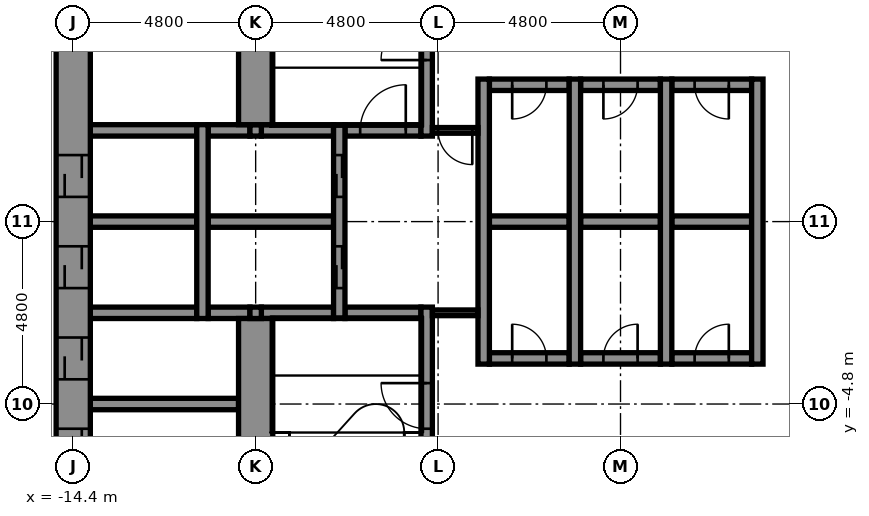
"""IFC4 building model, lengths in metres.
Left out: names, types, materials, properties, quantities, classifications, styles, units other than length and angle.
Written with IfcOpenShell. Run it as: python <this file> out.ifc"""

import sys

from ifc_helpers import new_model, si_unit, direction, frame, frame_2d, origin, place, context, subcontext, project, spatial, rectangle, extrude, element, fill, save


model = new_model("IFC4")
c1 = context("Model", 3, precision=1e-05, world=origin(), true_north=direction((0.0, 1.0)))
c2 = subcontext(c1, "Body", "Model", "MODEL_VIEW")
j1 = project(units=[si_unit("LENGTHUNIT", "METRE"), si_unit("PLANEANGLEUNIT", "RADIAN")], contexts=[c1])
p1 = place(None, origin())
s1 = spatial("IfcSite", under=j1, at=p1, CompositionType="ELEMENT")
p2 = place(p1, origin())
s2 = spatial("IfcBuilding", under=s1, at=p2, CompositionType="ELEMENT")
p3 = place(p2, frame((0.0, 0.0, 77.9)))
s3 = spatial("IfcBuildingStorey", under=s2, at=p3, CompositionType="ELEMENT", Elevation=77.9)
p4 = place(p3, frame((-13.95, -4.8, -0.2), z_axis=(0.0, 0.0, 1.0), x_axis=(1.0, 0.0, 0.0)))
e1 = element("IfcWall", 1, at=p4, inside=s3, PredefinedType="STANDARD", context=c2, shape_type="SweptSolid", body=[
    extrude(rectangle(XDim=3.9, YDim=0.3, at=frame_2d((1.95, 0.0))), origin(), (0.0, 0.0, 1.0), 4.5),
])
p5 = place(p3, frame((-3.45, -3.6, -0.2), z_axis=(0.0, 0.0, 1.0), x_axis=(1.0, 0.0, 0.0)))
e2 = element("IfcWall", 2, at=p5, inside=s3, PredefinedType="STANDARD", context=c2, shape_type="SweptSolid", body=[
    extrude(rectangle(XDim=2.1, YDim=0.3, at=frame_2d((1.05, 0.0))), origin(), (0.0, 0.0, 1.0), 4.5),
])
p6 = place(p5, frame((0.6, 0.0, 0.2)))
e3 = element("IfcOpeningElement", 3, at=p6, cuts=e2, PredefinedType="OPENING", context=c2, shape_type="SweptSolid", body=[
    extrude(rectangle(XDim=0.9, YDim=2.1, at=frame_2d((0.45, 1.05))), frame((0.0, 0.16, 0.0), z_axis=(0.0, -1.0, 0.0), x_axis=(1.0, 0.0, 0.0)), (0.0, 0.0, 1.0), 0.32),
])
p7 = place(p3, frame((-1.05, -3.6, -0.2), z_axis=(0.0, 0.0, 1.0), x_axis=(1.0, 0.0, 0.0)))
e4 = element("IfcWall", 4, at=p7, inside=s3, PredefinedType="STANDARD", context=c2, shape_type="SweptSolid", body=[
    extrude(rectangle(XDim=2.1, YDim=0.3, at=frame_2d((1.05, 0.0))), origin(), (0.0, 0.0, 1.0), 4.5),
])
p8 = place(p7, frame((0.6, 0.0, 0.2)))
e5 = element("IfcOpeningElement", 5, at=p8, cuts=e4, PredefinedType="OPENING", context=c2, shape_type="SweptSolid", body=[
    extrude(rectangle(XDim=0.9, YDim=2.1, at=frame_2d((0.45, 1.05))), frame((0.0, 0.16, 0.0), z_axis=(0.0, -1.0, 0.0), x_axis=(1.0, 0.0, 0.0)), (0.0, 0.0, 1.0), 0.32),
])
p9 = place(p3, frame((1.35, -3.6, -0.2), z_axis=(0.0, 0.0, 1.0), x_axis=(1.0, 0.0, 0.0)))
e6 = element("IfcWall", 6, at=p9, inside=s3, PredefinedType="STANDARD", context=c2, shape_type="SweptSolid", body=[
    extrude(rectangle(XDim=2.1, YDim=0.3, at=frame_2d((1.05, 0.0))), origin(), (0.0, 0.0, 1.0), 4.5),
])
p10 = place(p9, frame((0.6, 0.0, 0.2)))
e7 = element("IfcOpeningElement", 7, at=p10, cuts=e6, PredefinedType="OPENING", context=c2, shape_type="SweptSolid", body=[
    extrude(rectangle(XDim=0.9, YDim=2.1, at=frame_2d((0.45, 1.05))), frame((0.0, 0.16, 0.0), z_axis=(0.0, -1.0, 0.0), x_axis=(1.0, 0.0, 0.0)), (0.0, 0.0, 1.0), 0.32),
])
p11 = place(p3, frame((-13.95, -2.4, -0.2), z_axis=(0.0, 0.0, 1.0), x_axis=(1.0, 0.0, 0.0)))
e8 = element("IfcWall", 8, at=p11, inside=s3, PredefinedType="STANDARD", context=c2, shape_type="SweptSolid", body=[
    extrude(rectangle(XDim=2.8, YDim=0.3, at=frame_2d((1.4, 0.0))), origin(), (0.0, 0.0, 1.0), 4.5),
])
p12 = place(p3, frame((-10.85, -2.4, -0.2), z_axis=(0.0, 0.0, 1.0), x_axis=(1.0, 0.0, 0.0)))
e9 = element("IfcWall", 9, at=p12, inside=s3, PredefinedType="STANDARD", context=c2, shape_type="SweptSolid", body=[
    extrude(rectangle(XDim=1.1, YDim=0.3, at=frame_2d((0.55, 0.0))), origin(), (0.0, 0.0, 1.0), 4.5),
])
p13 = place(p3, frame((-9.45, -2.4, -0.2), z_axis=(0.0, 0.0, 1.0), x_axis=(1.0, 0.0, 0.0)))
e10 = element("IfcWall", 10, at=p13, inside=s3, PredefinedType="STANDARD", context=c2, shape_type="SweptSolid", body=[
    extrude(rectangle(XDim=1.9, YDim=0.3, at=frame_2d((0.95, 0.0))), origin(), (0.0, 0.0, 1.0), 4.5),
])
p14 = place(p3, frame((-7.25, -2.4, -0.2), z_axis=(0.0, 0.0, 1.0), x_axis=(1.0, 0.0, 0.0)))
e11 = element("IfcWall", 11, at=p14, inside=s3, PredefinedType="STANDARD", context=c2, shape_type="SweptSolid", body=[
    extrude(rectangle(XDim=2.0, YDim=0.3, at=frame_2d((1.0, 0.0))), origin(), (0.0, 0.0, 1.0), 4.5),
])
p15 = place(p3, frame((-13.95, 0.0, -0.2), z_axis=(0.0, 0.0, 1.0), x_axis=(1.0, 0.0, 0.0)))
e12 = element("IfcWall", 12, at=p15, inside=s3, PredefinedType="STANDARD", context=c2, shape_type="SweptSolid", body=[
    extrude(rectangle(XDim=2.8, YDim=0.3, at=frame_2d((1.4, 0.0))), origin(), (0.0, 0.0, 1.0), 4.5),
])
p16 = place(p3, frame((-10.85, 0.0, -0.2), z_axis=(0.0, 0.0, 1.0), x_axis=(1.0, 0.0, 0.0)))
e13 = element("IfcWall", 13, at=p16, inside=s3, PredefinedType="STANDARD", context=c2, shape_type="SweptSolid", body=[
    extrude(rectangle(XDim=3.3, YDim=0.3, at=frame_2d((1.65, 0.0))), origin(), (0.0, 0.0, 1.0), 4.5),
])
p17 = place(p3, frame((-3.45, 0.0, -0.2), z_axis=(0.0, 0.0, 1.0), x_axis=(1.0, 0.0, 0.0)))
e14 = element("IfcWall", 14, at=p17, inside=s3, PredefinedType="STANDARD", context=c2, shape_type="SweptSolid", body=[
    extrude(rectangle(XDim=2.1, YDim=0.3, at=frame_2d((1.05, 0.0))), origin(), (0.0, 0.0, 1.0), 4.5),
])
p18 = place(p3, frame((-1.05, 0.0, -0.2), z_axis=(0.0, 0.0, 1.0), x_axis=(1.0, 0.0, 0.0)))
e15 = element("IfcWall", 15, at=p18, inside=s3, PredefinedType="STANDARD", context=c2, shape_type="SweptSolid", body=[
    extrude(rectangle(XDim=2.1, YDim=0.3, at=frame_2d((1.05, 0.0))), origin(), (0.0, 0.0, 1.0), 4.5),
])
p19 = place(p3, frame((1.35, 0.0, -0.2), z_axis=(0.0, 0.0, 1.0), x_axis=(1.0, 0.0, 0.0)))
e16 = element("IfcWall", 16, at=p19, inside=s3, PredefinedType="STANDARD", context=c2, shape_type="SweptSolid", body=[
    extrude(rectangle(XDim=2.1, YDim=0.3, at=frame_2d((1.05, 0.0))), origin(), (0.0, 0.0, 1.0), 4.5),
])
p20 = place(p3, frame((-13.95, 2.4, -0.2), z_axis=(0.0, 0.0, 1.0), x_axis=(1.0, 0.0, 0.0)))
e17 = element("IfcWall", 17, at=p20, inside=s3, PredefinedType="STANDARD", context=c2, shape_type="SweptSolid", body=[
    extrude(rectangle(XDim=2.8, YDim=0.3, at=frame_2d((1.4, 0.0))), origin(), (0.0, 0.0, 1.0), 4.5),
])
p21 = place(p3, frame((-10.85, 2.4, -0.2), z_axis=(0.0, 0.0, 1.0), x_axis=(1.0, 0.0, 0.0)))
e18 = element("IfcWall", 18, at=p21, inside=s3, PredefinedType="STANDARD", context=c2, shape_type="SweptSolid", body=[
    extrude(rectangle(XDim=1.1, YDim=0.3, at=frame_2d((0.55, 0.0))), origin(), (0.0, 0.0, 1.0), 4.5),
])
p22 = place(p3, frame((-9.45, 2.4, -0.2), z_axis=(0.0, 0.0, 1.0), x_axis=(1.0, 0.0, 0.0)))
e19 = element("IfcWall", 19, at=p22, inside=s3, PredefinedType="STANDARD", context=c2, shape_type="SweptSolid", body=[
    extrude(rectangle(XDim=1.9, YDim=0.3, at=frame_2d((0.95, 0.0))), origin(), (0.0, 0.0, 1.0), 4.5),
])
p23 = place(p3, frame((-7.25, 2.4, -0.2), z_axis=(0.0, 0.0, 1.0), x_axis=(1.0, 0.0, 0.0)))
e20 = element("IfcWall", 20, at=p23, inside=s3, PredefinedType="STANDARD", context=c2, shape_type="SweptSolid", body=[
    extrude(rectangle(XDim=2.0, YDim=0.3, at=frame_2d((1.0, 0.0))), origin(), (0.0, 0.0, 1.0), 4.5),
])
p24 = place(p23, frame((0.4, 0.0, 0.2)))
e21 = element("IfcOpeningElement", 21, at=p24, cuts=e20, PredefinedType="OPENING", context=c2, shape_type="SweptSolid", body=[
    extrude(rectangle(XDim=1.2, YDim=2.1, at=frame_2d((0.6, 1.05))), frame((0.0, 0.16, 0.0), z_axis=(0.0, -1.0, 0.0), x_axis=(1.0, 0.0, 0.0)), (0.0, 0.0, 1.0), 0.32),
])
p25 = place(p3, frame((-3.45, 3.6, -0.2), z_axis=(0.0, 0.0, 1.0), x_axis=(1.0, 0.0, 0.0)))
e22 = element("IfcWall", 22, at=p25, inside=s3, PredefinedType="STANDARD", context=c2, shape_type="SweptSolid", body=[
    extrude(rectangle(XDim=2.1, YDim=0.3, at=frame_2d((1.05, 0.0))), origin(), (0.0, 0.0, 1.0), 4.5),
])
p26 = place(p25, frame((0.6, 0.0, 0.2)))
e23 = element("IfcOpeningElement", 23, at=p26, cuts=e22, PredefinedType="OPENING", context=c2, shape_type="SweptSolid", body=[
    extrude(rectangle(XDim=0.9, YDim=2.1, at=frame_2d((0.45, 1.05))), frame((0.0, 0.16, 0.0), z_axis=(0.0, -1.0, 0.0), x_axis=(1.0, 0.0, 0.0)), (0.0, 0.0, 1.0), 0.32),
])
p27 = place(p3, frame((-1.05, 3.6, -0.2), z_axis=(0.0, 0.0, 1.0), x_axis=(1.0, 0.0, 0.0)))
e24 = element("IfcWall", 24, at=p27, inside=s3, PredefinedType="STANDARD", context=c2, shape_type="SweptSolid", body=[
    extrude(rectangle(XDim=2.1, YDim=0.3, at=frame_2d((1.05, 0.0))), origin(), (0.0, 0.0, 1.0), 4.5),
])
p28 = place(p27, frame((0.6, 0.0, 0.2)))
e25 = element("IfcOpeningElement", 25, at=p28, cuts=e24, PredefinedType="OPENING", context=c2, shape_type="SweptSolid", body=[
    extrude(rectangle(XDim=0.9, YDim=2.1, at=frame_2d((0.45, 1.05))), frame((0.0, 0.16, 0.0), z_axis=(0.0, -1.0, 0.0), x_axis=(1.0, 0.0, 0.0)), (0.0, 0.0, 1.0), 0.32),
])
p29 = place(p3, frame((1.35, 3.6, -0.2), z_axis=(0.0, 0.0, 1.0), x_axis=(1.0, 0.0, 0.0)))
e26 = element("IfcWall", 26, at=p29, inside=s3, PredefinedType="STANDARD", context=c2, shape_type="SweptSolid", body=[
    extrude(rectangle(XDim=2.1, YDim=0.3, at=frame_2d((1.05, 0.0))), origin(), (0.0, 0.0, 1.0), 4.5),
])
p30 = place(p29, frame((0.6, 0.0, 0.2)))
e27 = element("IfcOpeningElement", 27, at=p30, cuts=e26, PredefinedType="OPENING", context=c2, shape_type="SweptSolid", body=[
    extrude(rectangle(XDim=0.9, YDim=2.1, at=frame_2d((0.45, 1.05))), frame((0.0, 0.16, 0.0), z_axis=(0.0, -1.0, 0.0), x_axis=(1.0, 0.0, 0.0)), (0.0, 0.0, 1.0), 0.32),
])
p31 = place(p3, frame((-14.4, -10.05, -0.2), z_axis=(0.0, 0.0, 1.0), x_axis=(0.0, 1.0, 0.0)))
e28 = element("IfcWall", 28, at=p31, inside=s3, PredefinedType="SHEAR", context=c2, shape_type="SweptSolid", body=[
    extrude(rectangle(XDim=20.1, YDim=0.9, at=frame_2d((10.05, 0.0))), origin(), (0.0, 0.0, 1.0), 4.5),
])
p32 = place(p31, frame((3.5, 0.0, 0.2)))
e29 = element("IfcOpeningElement", 29, at=p32, cuts=e28, PredefinedType="OPENING", context=c2, shape_type="SweptSolid", body=[
    extrude(rectangle(XDim=1.1, YDim=2.1, at=frame_2d((0.55, 1.05))), frame((0.0, 0.46, 0.0), z_axis=(0.0, -1.0, 0.0), x_axis=(1.0, 0.0, 0.0)), (0.0, 0.0, 1.0), 0.92),
])
p33 = place(p31, frame((5.9, 0.0, 0.2)))
e30 = element("IfcOpeningElement", 30, at=p33, cuts=e28, PredefinedType="OPENING", context=c2, shape_type="SweptSolid", body=[
    extrude(rectangle(XDim=1.1, YDim=2.1, at=frame_2d((0.55, 1.05))), frame((0.0, 0.46, 0.0), z_axis=(0.0, -1.0, 0.0), x_axis=(1.0, 0.0, 0.0)), (0.0, 0.0, 1.0), 0.92),
])
p34 = place(p31, frame((8.3, 0.0, 0.2)))
e31 = element("IfcOpeningElement", 31, at=p34, cuts=e28, PredefinedType="OPENING", context=c2, shape_type="SweptSolid", body=[
    extrude(rectangle(XDim=1.1, YDim=2.1, at=frame_2d((0.55, 1.05))), frame((0.0, 0.46, 0.0), z_axis=(0.0, -1.0, 0.0), x_axis=(1.0, 0.0, 0.0)), (0.0, 0.0, 1.0), 0.92),
])
p35 = place(p31, frame((10.7, 0.0, 0.2)))
e32 = element("IfcOpeningElement", 32, at=p35, cuts=e28, PredefinedType="OPENING", context=c2, shape_type="SweptSolid", body=[
    extrude(rectangle(XDim=1.1, YDim=2.1, at=frame_2d((0.55, 1.05))), frame((0.0, 0.46, 0.0), z_axis=(0.0, -1.0, 0.0), x_axis=(1.0, 0.0, 0.0)), (0.0, 0.0, 1.0), 0.92),
])
p36 = place(p3, frame((-11.0, -2.55, -0.2), z_axis=(0.0, 0.0, 1.0), x_axis=(0.0, 1.0, 0.0)))
e33 = element("IfcWall", 33, at=p36, inside=s3, PredefinedType="STANDARD", context=c2, shape_type="SweptSolid", body=[
    extrude(rectangle(XDim=5.1, YDim=0.3, at=frame_2d((2.55, 0.0))), origin(), (0.0, 0.0, 1.0), 4.5),
])
p37 = place(p3, frame((-9.6, -10.15, -0.2), z_axis=(0.0, 0.0, 1.0), x_axis=(0.0, 1.0, 0.0)))
e34 = element("IfcWall", 34, at=p37, inside=s3, PredefinedType="SHEAR", context=c2, shape_type="SweptSolid", body=[
    extrude(rectangle(XDim=7.6, YDim=0.9, at=frame_2d((3.8, 0.0))), origin(), (0.0, 0.0, 1.0), 4.5),
])
for number, where, z_axis, x_axis in (
    (35, (-9.6, -2.55, -0.2), (0.0, 0.0, 1.0), (0.0, 1.0, 0.0)),
    (36, (-9.6, 2.25, -0.2), (0.0, 0.0, 1.0), (0.0, 1.0, 0.0)),
):
    element("IfcWall", number, at=place(p3, frame(where, z_axis=z_axis, x_axis=x_axis)), inside=s3, PredefinedType="STANDARD", context=c2, shape_type="SweptSolid", body=[
        extrude(rectangle(XDim=0.3, YDim=0.3, at=frame_2d((0.15, 0.0))), origin(), (0.0, 0.0, 1.0), 4.5),
    ])
p38 = place(p3, frame((-9.6, 2.55, -0.2), z_axis=(0.0, 0.0, 1.0), x_axis=(0.0, 1.0, 0.0)))
e37 = element("IfcWall", 37, at=p38, inside=s3, PredefinedType="SHEAR", context=c2, shape_type="SweptSolid", body=[
    extrude(rectangle(XDim=7.6, YDim=0.9, at=frame_2d((3.8, 0.0))), origin(), (0.0, 0.0, 1.0), 4.5),
])
p39 = place(p3, frame((-7.4, -2.55, -0.2), z_axis=(0.0, 0.0, 1.0), x_axis=(0.0, 1.0, 0.0)))
e38 = element("IfcWall", 38, at=p39, inside=s3, PredefinedType="STANDARD", context=c2, shape_type="SweptSolid", body=[
    extrude(rectangle(XDim=5.1, YDim=0.3, at=frame_2d((2.55, 0.0))), origin(), (0.0, 0.0, 1.0), 4.5),
])
p40 = place(p39, frame((0.8, 0.0, 0.2)))
e39 = element("IfcOpeningElement", 39, at=p40, cuts=e38, PredefinedType="OPENING", context=c2, shape_type="SweptSolid", body=[
    extrude(rectangle(XDim=1.1, YDim=2.1, at=frame_2d((0.55, 1.05))), frame((0.0, 0.16, 0.0), z_axis=(0.0, -1.0, 0.0), x_axis=(1.0, 0.0, 0.0)), (0.0, 0.0, 1.0), 0.32),
])
p41 = place(p39, frame((3.2, 0.0, 0.2)))
e40 = element("IfcOpeningElement", 40, at=p41, cuts=e38, PredefinedType="OPENING", context=c2, shape_type="SweptSolid", body=[
    extrude(rectangle(XDim=1.1, YDim=2.1, at=frame_2d((0.55, 1.05))), frame((0.0, 0.16, 0.0), z_axis=(0.0, -1.0, 0.0), x_axis=(1.0, 0.0, 0.0)), (0.0, 0.0, 1.0), 0.32),
])
p42 = place(p3, frame((-5.1, -9.15, -0.2), z_axis=(0.0, 0.0, 1.0), x_axis=(0.0, 1.0, 0.0)))
e41 = element("IfcWall", 41, at=p42, inside=s3, PredefinedType="STANDARD", context=c2, shape_type="SweptSolid", body=[
    extrude(rectangle(XDim=6.9, YDim=0.3, at=frame_2d((3.45, 0.0))), origin(), (0.0, 0.0, 1.0), 4.5),
])
p43 = place(p42, frame((3.7, 0.0, 0.2)))
e42 = element("IfcOpeningElement", 42, at=p43, cuts=e41, PredefinedType="OPENING", context=c2, shape_type="SweptSolid", body=[
    extrude(rectangle(XDim=1.2, YDim=2.1, at=frame_2d((0.6, 1.05))), frame((0.0, 0.16, 0.0), z_axis=(0.0, -1.0, 0.0), x_axis=(1.0, 0.0, 0.0)), (0.0, 0.0, 1.0), 0.32),
])
p44 = place(p3, frame((-5.1, 2.25, -0.2), z_axis=(0.0, 0.0, 1.0), x_axis=(0.0, 1.0, 0.0)))
e43 = element("IfcWall", 43, at=p44, inside=s3, PredefinedType="STANDARD", context=c2, shape_type="SweptSolid", body=[
    extrude(rectangle(XDim=6.9, YDim=0.3, at=frame_2d((3.45, 0.0))), origin(), (0.0, 0.0, 1.0), 4.5),
])
p45 = place(p44, frame((2.0, 0.0, 0.2)))
e44 = element("IfcOpeningElement", 44, at=p45, cuts=e43, PredefinedType="OPENING", context=c2, shape_type="SweptSolid", body=[
    extrude(rectangle(XDim=1.2, YDim=2.1, at=frame_2d((0.6, 1.05))), frame((0.0, 0.16, 0.0), z_axis=(0.0, -1.0, 0.0), x_axis=(1.0, 0.0, 0.0)), (0.0, 0.0, 1.0), 0.32),
])
for number, where, z_axis, x_axis in (
    (45, (-3.6, -3.75, -0.2), (0.0, 0.0, 1.0), (0.0, 1.0, 0.0)),
    (46, (-1.2, -3.75, -0.2), (0.0, 0.0, 1.0), (0.0, 1.0, 0.0)),
    (47, (1.2, -3.75, -0.2), (0.0, 0.0, 1.0), (0.0, 1.0, 0.0)),
    (48, (3.6, -3.75, -0.2), (0.0, 0.0, 1.0), (0.0, 1.0, 0.0)),
):
    element("IfcWall", number, at=place(p3, frame(where, z_axis=z_axis, x_axis=x_axis)), inside=s3, PredefinedType="STANDARD", context=c2, shape_type="SweptSolid", body=[
        extrude(rectangle(XDim=7.5, YDim=0.3, at=frame_2d((3.75, 0.0))), origin(), (0.0, 0.0, 1.0), 4.5),
    ])
p46 = place(p3, frame((-4.95, 2.4, 0.0), z_axis=(0.0, 0.0, 1.0), x_axis=(1.0, 0.0, 0.0)))
e49 = element("IfcWall", 49, at=p46, inside=s3, PredefinedType="PARTITIONING", context=c2, shape_type="SweptSolid", body=[
    extrude(rectangle(XDim=1.2, YDim=0.15, at=frame_2d((0.6, 0.0))), origin(), (0.0, 0.0, 1.0), 4.3),
])
p47 = place(p46, frame((0.15, 0.0, 0.0)))
e50 = element("IfcOpeningElement", 50, at=p47, cuts=e49, PredefinedType="OPENING", context=c2, shape_type="SweptSolid", body=[
    extrude(rectangle(XDim=0.9, YDim=2.1, at=frame_2d((0.45, 1.05))), frame((0.0, 0.085, 0.0), z_axis=(0.0, -1.0, 0.0), x_axis=(1.0, 0.0, 0.0)), (0.0, 0.0, 1.0), 0.17),
])
p48 = place(p3, frame((-4.95, -2.4, 0.0), z_axis=(0.0, 0.0, 1.0), x_axis=(1.0, 0.0, 0.0)))
e51 = element("IfcWall", 51, at=p48, inside=s3, PredefinedType="PARTITIONING", context=c2, shape_type="SweptSolid", body=[
    extrude(rectangle(XDim=1.2, YDim=0.15, at=frame_2d((0.6, 0.0))), origin(), (0.0, 0.0, 1.0), 4.3),
])
p49 = place(p40, origin())
e52 = element("IfcDoor", 52, at=p49, inside=s3, OperationType="DOUBLE_DOOR_SLIDING", PredefinedType="DOOR", context=c2, shape_type="SweptSolid", body=[
    extrude(rectangle(XDim=1.1, YDim=2.1, at=frame_2d((0.55, 1.05))), frame((0.0, 0.025, 0.0), z_axis=(0.0, -1.0, 0.0), x_axis=(1.0, 0.0, 0.0)), (0.0, 0.0, 1.0), 0.05),
])
fill(e39, e52)
p50 = place(p41, origin())
e53 = element("IfcDoor", 53, at=p50, inside=s3, OperationType="DOUBLE_DOOR_SLIDING", PredefinedType="DOOR", context=c2, shape_type="SweptSolid", body=[
    extrude(rectangle(XDim=1.1, YDim=2.1, at=frame_2d((0.55, 1.05))), frame((0.0, 0.025, 0.0), z_axis=(0.0, -1.0, 0.0), x_axis=(1.0, 0.0, 0.0)), (0.0, 0.0, 1.0), 0.05),
])
fill(e40, e53)
p51 = place(p32, origin())
e54 = element("IfcDoor", 54, at=p51, inside=s3, OperationType="DOUBLE_DOOR_SLIDING", PredefinedType="DOOR", context=c2, shape_type="SweptSolid", body=[
    extrude(rectangle(XDim=1.1, YDim=2.1, at=frame_2d((0.55, 1.05))), frame((0.0, 0.025, 0.0), z_axis=(0.0, -1.0, 0.0), x_axis=(1.0, 0.0, 0.0)), (0.0, 0.0, 1.0), 0.05),
])
fill(e29, e54)
p52 = place(p33, origin())
e55 = element("IfcDoor", 55, at=p52, inside=s3, OperationType="DOUBLE_DOOR_SLIDING", PredefinedType="DOOR", context=c2, shape_type="SweptSolid", body=[
    extrude(rectangle(XDim=1.1, YDim=2.1, at=frame_2d((0.55, 1.05))), frame((0.0, 0.025, 0.0), z_axis=(0.0, -1.0, 0.0), x_axis=(1.0, 0.0, 0.0)), (0.0, 0.0, 1.0), 0.05),
])
fill(e30, e55)
p53 = place(p34, origin())
e56 = element("IfcDoor", 56, at=p53, inside=s3, OperationType="DOUBLE_DOOR_SLIDING", PredefinedType="DOOR", context=c2, shape_type="SweptSolid", body=[
    extrude(rectangle(XDim=1.1, YDim=2.1, at=frame_2d((0.55, 1.05))), frame((0.0, 0.025, 0.0), z_axis=(0.0, -1.0, 0.0), x_axis=(1.0, 0.0, 0.0)), (0.0, 0.0, 1.0), 0.05),
])
fill(e31, e56)
p54 = place(p35, origin())
e57 = element("IfcDoor", 57, at=p54, inside=s3, OperationType="DOUBLE_DOOR_SLIDING", PredefinedType="DOOR", context=c2, shape_type="SweptSolid", body=[
    extrude(rectangle(XDim=1.1, YDim=2.1, at=frame_2d((0.55, 1.05))), frame((0.0, 0.025, 0.0), z_axis=(0.0, -1.0, 0.0), x_axis=(1.0, 0.0, 0.0)), (0.0, 0.0, 1.0), 0.05),
])
fill(e32, e57)
p55 = place(p45, origin())
e58 = element("IfcDoor", 58, at=p55, inside=s3, OperationType="SINGLE_SWING_LEFT", PredefinedType="DOOR", context=c2, shape_type="SweptSolid", body=[
    extrude(rectangle(XDim=1.2, YDim=2.1, at=frame_2d((0.6, 1.05))), frame((0.0, 0.025, 0.0), z_axis=(0.0, -1.0, 0.0), x_axis=(1.0, 0.0, 0.0)), (0.0, 0.0, 1.0), 0.05),
])
fill(e44, e58)
p56 = place(p43, origin())
e59 = element("IfcDoor", 59, at=p56, inside=s3, OperationType="SINGLE_SWING_RIGHT", PredefinedType="DOOR", context=c2, shape_type="SweptSolid", body=[
    extrude(rectangle(XDim=1.2, YDim=2.1, at=frame_2d((0.6, 1.05))), frame((0.0, 0.025, 0.0), z_axis=(0.0, -1.0, 0.0), x_axis=(1.0, 0.0, 0.0)), (0.0, 0.0, 1.0), 0.05),
])
fill(e42, e59)
p57 = place(p26, frame((0.9, 0.0, 0.0), z_axis=(0.0, 0.0, 1.0), x_axis=(-1.0, 0.0, 0.0)))
e60 = element("IfcDoor", 60, at=p57, inside=s3, OperationType="SINGLE_SWING_LEFT", PredefinedType="DOOR", context=c2, shape_type="SweptSolid", body=[
    extrude(rectangle(XDim=0.9, YDim=2.1, at=frame_2d((0.45, 1.05))), frame((0.0, 0.025, 0.0), z_axis=(0.0, -1.0, 0.0), x_axis=(1.0, 0.0, 0.0)), (0.0, 0.0, 1.0), 0.05),
])
fill(e23, e60)
p58 = place(p28, frame((0.9, 0.0, 0.0), z_axis=(0.0, 0.0, 1.0), x_axis=(-1.0, 0.0, 0.0)))
e61 = element("IfcDoor", 61, at=p58, inside=s3, OperationType="SINGLE_SWING_LEFT", PredefinedType="DOOR", context=c2, shape_type="SweptSolid", body=[
    extrude(rectangle(XDim=0.9, YDim=2.1, at=frame_2d((0.45, 1.05))), frame((0.0, 0.025, 0.0), z_axis=(0.0, -1.0, 0.0), x_axis=(1.0, 0.0, 0.0)), (0.0, 0.0, 1.0), 0.05),
])
fill(e25, e61)
p59 = place(p30, frame((0.9, 0.0, 0.0), z_axis=(0.0, 0.0, 1.0), x_axis=(-1.0, 0.0, 0.0)))
e62 = element("IfcDoor", 62, at=p59, inside=s3, OperationType="SINGLE_SWING_RIGHT", PredefinedType="DOOR", context=c2, shape_type="SweptSolid", body=[
    extrude(rectangle(XDim=0.9, YDim=2.1, at=frame_2d((0.45, 1.05))), frame((0.0, 0.025, 0.0), z_axis=(0.0, -1.0, 0.0), x_axis=(1.0, 0.0, 0.0)), (0.0, 0.0, 1.0), 0.05),
])
fill(e27, e62)
p60 = place(p6, origin())
e63 = element("IfcDoor", 63, at=p60, inside=s3, OperationType="SINGLE_SWING_LEFT", PredefinedType="DOOR", context=c2, shape_type="SweptSolid", body=[
    extrude(rectangle(XDim=0.9, YDim=2.1, at=frame_2d((0.45, 1.05))), frame((0.0, 0.025, 0.0), z_axis=(0.0, -1.0, 0.0), x_axis=(1.0, 0.0, 0.0)), (0.0, 0.0, 1.0), 0.05),
])
fill(e3, e63)
p61 = place(p8, origin())
e64 = element("IfcDoor", 64, at=p61, inside=s3, OperationType="SINGLE_SWING_RIGHT", PredefinedType="DOOR", context=c2, shape_type="SweptSolid", body=[
    extrude(rectangle(XDim=0.9, YDim=2.1, at=frame_2d((0.45, 1.05))), frame((0.0, 0.025, 0.0), z_axis=(0.0, -1.0, 0.0), x_axis=(1.0, 0.0, 0.0)), (0.0, 0.0, 1.0), 0.05),
])
fill(e5, e64)
p62 = place(p10, origin())
e65 = element("IfcDoor", 65, at=p62, inside=s3, OperationType="SINGLE_SWING_RIGHT", PredefinedType="DOOR", context=c2, shape_type="SweptSolid", body=[
    extrude(rectangle(XDim=0.9, YDim=2.1, at=frame_2d((0.45, 1.05))), frame((0.0, 0.025, 0.0), z_axis=(0.0, -1.0, 0.0), x_axis=(1.0, 0.0, 0.0)), (0.0, 0.0, 1.0), 0.05),
])
fill(e7, e65)
p63 = place(p47, frame((0.9, 0.0, 0.0), z_axis=(0.0, 0.0, 1.0), x_axis=(-1.0, 0.0, 0.0)))
e66 = element("IfcDoor", 66, at=p63, inside=s3, OperationType="SINGLE_SWING_RIGHT", PredefinedType="DOOR", context=c2, shape_type="SweptSolid", body=[
    extrude(rectangle(XDim=0.9, YDim=2.1, at=frame_2d((0.45, 1.05))), frame((0.0, 0.025, 0.0), z_axis=(0.0, -1.0, 0.0), x_axis=(1.0, 0.0, 0.0)), (0.0, 0.0, 1.0), 0.05),
])
fill(e50, e66)
p64 = place(p24, origin())
e67 = element("IfcDoor", 67, at=p64, inside=s3, OperationType="SINGLE_SWING_RIGHT", PredefinedType="DOOR", context=c2, shape_type="SweptSolid", body=[
    extrude(rectangle(XDim=1.2, YDim=2.1, at=frame_2d((0.6, 1.05))), frame((0.0, 0.025, 0.0), z_axis=(0.0, -1.0, 0.0), x_axis=(1.0, 0.0, 0.0)), (0.0, 0.0, 1.0), 0.05),
])
fill(e21, e67)
save(model, sys.argv[1])
